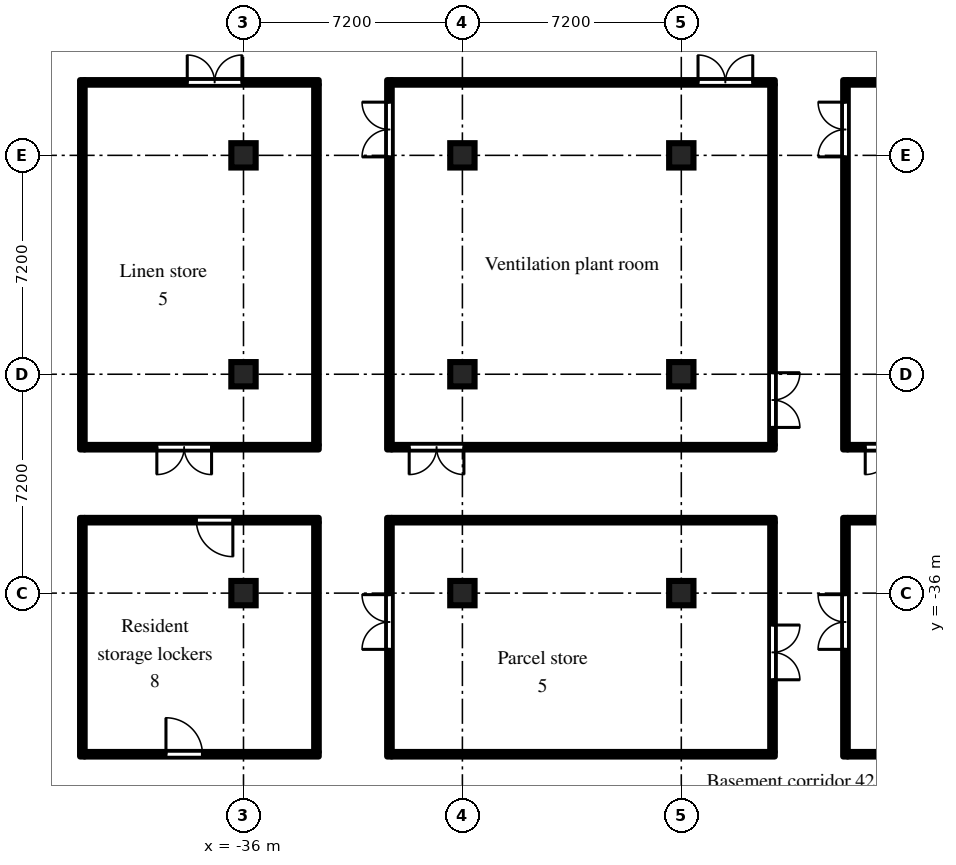
"""IFC4 building model, lengths in metres.
Left out: names, types, materials, properties, quantities, classifications, styles, units other than length and angle.
Written with IfcOpenShell. Run it as: python <this file> out.ifc"""

import sys

from ifc_helpers import new_model, si_unit, direction, frame, frame_2d, origin, origin_2d, place, context, subcontext, project, spatial, rectangle, extrude, element, fill, save


model = new_model("IFC4")
c1 = context("Model", 3, precision=1e-05, world=origin(), true_north=direction((0.0, 1.0)))
c2 = subcontext(c1, "Body", "Model", "MODEL_VIEW")
j1 = project(units=[si_unit("LENGTHUNIT", "METRE"), si_unit("PLANEANGLEUNIT", "RADIAN")], contexts=[c1])
p1 = place(None, origin())
s1 = spatial("IfcSite", under=j1, at=p1, CompositionType="ELEMENT")
p2 = place(p1, origin())
s2 = spatial("IfcBuilding", under=s1, at=p2, CompositionType="ELEMENT")
p3 = place(p2, frame((0.0, 0.0, -4.8)))
s3 = spatial("IfcBuildingStorey", under=s2, at=p3, CompositionType="ELEMENT", Elevation=-4.8)
for number, where, z_axis, x_axis in (
    (1, (-36.0, -36.0, -0.5), (0.0, 0.0, 1.0), (1.0, 0.0, 0.0)),
    (2, (-36.0, -28.8, -0.5), (0.0, 0.0, 1.0), (1.0, 0.0, 0.0)),
    (3, (-36.0, -21.6, -0.5), (0.0, 0.0, 1.0), (1.0, 0.0, 0.0)),
    (4, (-28.8, -36.0, -0.5), (0.0, 0.0, 1.0), (1.0, 0.0, 0.0)),
    (5, (-28.8, -28.8, -0.5), (0.0, 0.0, 1.0), (1.0, 0.0, 0.0)),
    (6, (-28.8, -21.6, -0.5), (0.0, 0.0, 1.0), (1.0, 0.0, 0.0)),
    (7, (-21.6, -36.0, -0.5), (0.0, 0.0, 1.0), (1.0, 0.0, 0.0)),
    (8, (-21.6, -28.8, -0.5), (0.0, 0.0, 1.0), (1.0, 0.0, 0.0)),
    (9, (-21.6, -21.6, -0.5), (0.0, 0.0, 1.0), (1.0, 0.0, 0.0)),
):
    element("IfcColumn", number, at=place(p3, frame(where, z_axis=z_axis, x_axis=x_axis)), inside=s3, PredefinedType="COLUMN", context=c2, shape_type="SweptSolid", body=[
        extrude(rectangle(XDim=0.8, YDim=0.8, at=origin_2d()), origin(), (0.0, 0.0, 1.0), 5.3),
    ])
p4 = place(p3, frame((-41.3, -41.375, 0.0), z_axis=(0.0, 0.0, 1.0), x_axis=(0.0, 1.0, 0.0)))
e10 = element("IfcWall", 10, at=p4, inside=s3, PredefinedType="PARTITIONING", context=c2, shape_type="SweptSolid", body=[
    extrude(rectangle(XDim=7.85, YDim=0.15, at=frame_2d((3.925, 0.0))), origin(), (0.0, 0.0, 1.0), 4.35),
])
p5 = place(p3, frame((-41.225, -41.3, 0.0), z_axis=(0.0, 0.0, 1.0), x_axis=(1.0, 0.0, 0.0)))
e11 = element("IfcWall", 11, at=p5, inside=s3, PredefinedType="PARTITIONING", context=c2, shape_type="SweptSolid", body=[
    extrude(rectangle(XDim=7.7, YDim=0.15, at=frame_2d((3.85, 0.0))), origin(), (0.0, 0.0, 1.0), 4.35),
])
p6 = place(p5, frame((2.675, 0.0, 0.0)))
e12 = element("IfcOpeningElement", 12, at=p6, cuts=e11, PredefinedType="OPENING", context=c2, shape_type="SweptSolid", body=[
    extrude(rectangle(XDim=1.2, YDim=2.1, at=frame_2d((0.6, 1.05))), frame((0.0, 0.085, 0.0), z_axis=(0.0, -1.0, 0.0), x_axis=(1.0, 0.0, 0.0)), (0.0, 0.0, 1.0), 0.17),
])
p7 = place(p3, frame((-41.225, -33.6, 0.0), z_axis=(0.0, 0.0, 1.0), x_axis=(1.0, 0.0, 0.0)))
e13 = element("IfcWall", 13, at=p7, inside=s3, PredefinedType="PARTITIONING", context=c2, shape_type="SweptSolid", body=[
    extrude(rectangle(XDim=7.7, YDim=0.15, at=frame_2d((3.85, 0.0))), origin(), (0.0, 0.0, 1.0), 4.35),
])
p8 = place(p7, frame((3.675, 0.0, 0.0)))
e14 = element("IfcOpeningElement", 14, at=p8, cuts=e13, PredefinedType="OPENING", context=c2, shape_type="SweptSolid", body=[
    extrude(rectangle(XDim=1.2, YDim=2.1, at=frame_2d((0.6, 1.05))), frame((0.0, 0.085, 0.0), z_axis=(0.0, -1.0, 0.0), x_axis=(1.0, 0.0, 0.0)), (0.0, 0.0, 1.0), 0.17),
])
p9 = place(p3, frame((-41.3, -31.275, 0.0), z_axis=(0.0, 0.0, 1.0), x_axis=(0.0, 1.0, 0.0)))
e15 = element("IfcWall", 15, at=p9, inside=s3, PredefinedType="PARTITIONING", context=c2, shape_type="SweptSolid", body=[
    extrude(rectangle(XDim=12.15, YDim=0.15, at=frame_2d((6.075, 0.0))), origin(), (0.0, 0.0, 1.0), 4.35),
])
p10 = place(p3, frame((-41.225, -31.2, 0.0), z_axis=(0.0, 0.0, 1.0), x_axis=(1.0, 0.0, 0.0)))
e16 = element("IfcWall", 16, at=p10, inside=s3, PredefinedType="PARTITIONING", context=c2, shape_type="SweptSolid", body=[
    extrude(rectangle(XDim=7.7, YDim=0.15, at=frame_2d((3.85, 0.0))), origin(), (0.0, 0.0, 1.0), 4.35),
])
p11 = place(p10, frame((2.375, 0.0, 0.0)))
e17 = element("IfcOpeningElement", 17, at=p11, cuts=e16, PredefinedType="OPENING", context=c2, shape_type="SweptSolid", body=[
    extrude(rectangle(XDim=1.8, YDim=2.1, at=frame_2d((0.9, 1.05))), frame((0.0, 0.085, 0.0), z_axis=(0.0, -1.0, 0.0), x_axis=(1.0, 0.0, 0.0)), (0.0, 0.0, 1.0), 0.17),
])
p12 = place(p3, frame((-41.225, -19.2, 0.0), z_axis=(0.0, 0.0, 1.0), x_axis=(1.0, 0.0, 0.0)))
e18 = element("IfcWall", 18, at=p12, inside=s3, PredefinedType="PARTITIONING", context=c2, shape_type="SweptSolid", body=[
    extrude(rectangle(XDim=7.7, YDim=0.15, at=frame_2d((3.85, 0.0))), origin(), (0.0, 0.0, 1.0), 4.35),
])
p13 = place(p12, frame((3.375, 0.0, 0.0)))
e19 = element("IfcOpeningElement", 19, at=p13, cuts=e18, PredefinedType="OPENING", context=c2, shape_type="SweptSolid", body=[
    extrude(rectangle(XDim=1.8, YDim=2.1, at=frame_2d((0.9, 1.05))), frame((0.0, 0.085, 0.0), z_axis=(0.0, -1.0, 0.0), x_axis=(1.0, 0.0, 0.0)), (0.0, 0.0, 1.0), 0.17),
])
p14 = place(p3, frame((-33.6, -41.225, 0.0), z_axis=(0.0, 0.0, 1.0), x_axis=(0.0, 1.0, 0.0)))
e20 = element("IfcWall", 20, at=p14, inside=s3, PredefinedType="PARTITIONING", context=c2, shape_type="SweptSolid", body=[
    extrude(rectangle(XDim=7.55, YDim=0.15, at=frame_2d((3.775, 0.0))), origin(), (0.0, 0.0, 1.0), 4.35),
])
p15 = place(p3, frame((-33.6, -31.125, 0.0), z_axis=(0.0, 0.0, 1.0), x_axis=(0.0, 1.0, 0.0)))
e21 = element("IfcWall", 21, at=p15, inside=s3, PredefinedType="PARTITIONING", context=c2, shape_type="SweptSolid", body=[
    extrude(rectangle(XDim=11.85, YDim=0.15, at=frame_2d((5.925, 0.0))), origin(), (0.0, 0.0, 1.0), 4.35),
])
p16 = place(p3, frame((-31.2, -41.375, 0.0), z_axis=(0.0, 0.0, 1.0), x_axis=(0.0, 1.0, 0.0)))
e22 = element("IfcWall", 22, at=p16, inside=s3, PredefinedType="PARTITIONING", context=c2, shape_type="SweptSolid", body=[
    extrude(rectangle(XDim=7.85, YDim=0.15, at=frame_2d((3.925, 0.0))), origin(), (0.0, 0.0, 1.0), 4.35),
])
p17 = place(p16, frame((3.525, 0.0, 0.0)))
e23 = element("IfcOpeningElement", 23, at=p17, cuts=e22, PredefinedType="OPENING", context=c2, shape_type="SweptSolid", body=[
    extrude(rectangle(XDim=1.8, YDim=2.1, at=frame_2d((0.9, 1.05))), frame((0.0, 0.085, 0.0), z_axis=(0.0, -1.0, 0.0), x_axis=(1.0, 0.0, 0.0)), (0.0, 0.0, 1.0), 0.17),
])
for number, where, z_axis, x_axis in (
    (24, (-31.125, -41.3, 0.0), (0.0, 0.0, 1.0), (1.0, 0.0, 0.0)),
    (25, (-31.125, -33.6, 0.0), (0.0, 0.0, 1.0), (1.0, 0.0, 0.0)),
):
    element("IfcWall", number, at=place(p3, frame(where, z_axis=z_axis, x_axis=x_axis)), inside=s3, PredefinedType="PARTITIONING", context=c2, shape_type="SweptSolid", body=[
        extrude(rectangle(XDim=12.6, YDim=0.15, at=frame_2d((6.3, 0.0))), origin(), (0.0, 0.0, 1.0), 4.35),
    ])
p18 = place(p3, frame((-31.2, -31.275, 0.0), z_axis=(0.0, 0.0, 1.0), x_axis=(0.0, 1.0, 0.0)))
e26 = element("IfcWall", 26, at=p18, inside=s3, PredefinedType="PARTITIONING", context=c2, shape_type="SweptSolid", body=[
    extrude(rectangle(XDim=12.15, YDim=0.15, at=frame_2d((6.075, 0.0))), origin(), (0.0, 0.0, 1.0), 4.35),
])
p19 = place(p18, frame((9.625, 0.0, 0.0)))
e27 = element("IfcOpeningElement", 27, at=p19, cuts=e26, PredefinedType="OPENING", context=c2, shape_type="SweptSolid", body=[
    extrude(rectangle(XDim=1.8, YDim=2.1, at=frame_2d((0.9, 1.05))), frame((0.0, 0.085, 0.0), z_axis=(0.0, -1.0, 0.0), x_axis=(1.0, 0.0, 0.0)), (0.0, 0.0, 1.0), 0.17),
])
p20 = place(p3, frame((-31.125, -31.2, 0.0), z_axis=(0.0, 0.0, 1.0), x_axis=(1.0, 0.0, 0.0)))
e28 = element("IfcWall", 28, at=p20, inside=s3, PredefinedType="PARTITIONING", context=c2, shape_type="SweptSolid", body=[
    extrude(rectangle(XDim=12.6, YDim=0.15, at=frame_2d((6.3, 0.0))), origin(), (0.0, 0.0, 1.0), 4.35),
])
p21 = place(p20, frame((0.575, 0.0, 0.0)))
e29 = element("IfcOpeningElement", 29, at=p21, cuts=e28, PredefinedType="OPENING", context=c2, shape_type="SweptSolid", body=[
    extrude(rectangle(XDim=1.8, YDim=2.1, at=frame_2d((0.9, 1.05))), frame((0.0, 0.085, 0.0), z_axis=(0.0, -1.0, 0.0), x_axis=(1.0, 0.0, 0.0)), (0.0, 0.0, 1.0), 0.17),
])
p22 = place(p3, frame((-31.125, -19.2, 0.0), z_axis=(0.0, 0.0, 1.0), x_axis=(1.0, 0.0, 0.0)))
e30 = element("IfcWall", 30, at=p22, inside=s3, PredefinedType="PARTITIONING", context=c2, shape_type="SweptSolid", body=[
    extrude(rectangle(XDim=12.6, YDim=0.15, at=frame_2d((6.3, 0.0))), origin(), (0.0, 0.0, 1.0), 4.35),
])
p23 = place(p22, frame((10.075, 0.0, 0.0)))
e31 = element("IfcOpeningElement", 31, at=p23, cuts=e30, PredefinedType="OPENING", context=c2, shape_type="SweptSolid", body=[
    extrude(rectangle(XDim=1.8, YDim=2.1, at=frame_2d((0.9, 1.05))), frame((0.0, 0.085, 0.0), z_axis=(0.0, -1.0, 0.0), x_axis=(1.0, 0.0, 0.0)), (0.0, 0.0, 1.0), 0.17),
])
p24 = place(p3, frame((-18.6, -41.225, 0.0), z_axis=(0.0, 0.0, 1.0), x_axis=(0.0, 1.0, 0.0)))
e32 = element("IfcWall", 32, at=p24, inside=s3, PredefinedType="PARTITIONING", context=c2, shape_type="SweptSolid", body=[
    extrude(rectangle(XDim=7.55, YDim=0.15, at=frame_2d((3.775, 0.0))), origin(), (0.0, 0.0, 1.0), 4.35),
])
p25 = place(p24, frame((2.375, 0.0, 0.0)))
e33 = element("IfcOpeningElement", 33, at=p25, cuts=e32, PredefinedType="OPENING", context=c2, shape_type="SweptSolid", body=[
    extrude(rectangle(XDim=1.8, YDim=2.1, at=frame_2d((0.9, 1.05))), frame((0.0, 0.085, 0.0), z_axis=(0.0, -1.0, 0.0), x_axis=(1.0, 0.0, 0.0)), (0.0, 0.0, 1.0), 0.17),
])
p26 = place(p3, frame((-18.6, -31.125, 0.0), z_axis=(0.0, 0.0, 1.0), x_axis=(0.0, 1.0, 0.0)))
e34 = element("IfcWall", 34, at=p26, inside=s3, PredefinedType="PARTITIONING", context=c2, shape_type="SweptSolid", body=[
    extrude(rectangle(XDim=11.85, YDim=0.15, at=frame_2d((5.925, 0.0))), origin(), (0.0, 0.0, 1.0), 4.35),
])
p27 = place(p26, frame((0.575, 0.0, 0.0)))
e35 = element("IfcOpeningElement", 35, at=p27, cuts=e34, PredefinedType="OPENING", context=c2, shape_type="SweptSolid", body=[
    extrude(rectangle(XDim=1.8, YDim=2.1, at=frame_2d((0.9, 1.05))), frame((0.0, 0.085, 0.0), z_axis=(0.0, -1.0, 0.0), x_axis=(1.0, 0.0, 0.0)), (0.0, 0.0, 1.0), 0.17),
])
p28 = place(p3, frame((-16.2, -41.375, 0.0), z_axis=(0.0, 0.0, 1.0), x_axis=(0.0, 1.0, 0.0)))
e36 = element("IfcWall", 36, at=p28, inside=s3, PredefinedType="PARTITIONING", context=c2, shape_type="SweptSolid", body=[
    extrude(rectangle(XDim=7.85, YDim=0.15, at=frame_2d((3.925, 0.0))), origin(), (0.0, 0.0, 1.0), 4.35),
])
p29 = place(p28, frame((3.525, 0.0, 0.0)))
e37 = element("IfcOpeningElement", 37, at=p29, cuts=e36, PredefinedType="OPENING", context=c2, shape_type="SweptSolid", body=[
    extrude(rectangle(XDim=1.8, YDim=2.1, at=frame_2d((0.9, 1.05))), frame((0.0, 0.085, 0.0), z_axis=(0.0, -1.0, 0.0), x_axis=(1.0, 0.0, 0.0)), (0.0, 0.0, 1.0), 0.17),
])
p30 = place(p3, frame((-16.125, -41.3, 0.0), z_axis=(0.0, 0.0, 1.0), x_axis=(1.0, 0.0, 0.0)))
e38 = element("IfcWall", 38, at=p30, inside=s3, PredefinedType="PARTITIONING", context=c2, shape_type="SweptSolid", body=[
    extrude(rectangle(XDim=14.625, YDim=0.15, at=frame_2d((7.312, 0.0))), origin(), (0.0, 0.0, 1.0), 4.35),
])
p31 = place(p30, frame((10.725, 0.0, 0.0)))
e39 = element("IfcOpeningElement", 39, at=p31, cuts=e38, PredefinedType="OPENING", context=c2, shape_type="SweptSolid", body=[
    extrude(rectangle(XDim=1.8, YDim=2.1, at=frame_2d((0.9, 1.05))), frame((0.0, 0.085, 0.0), z_axis=(0.0, -1.0, 0.0), x_axis=(1.0, 0.0, 0.0)), (0.0, 0.0, 1.0), 0.17),
])
p32 = place(p3, frame((-16.125, -33.6, 0.0), z_axis=(0.0, 0.0, 1.0), x_axis=(1.0, 0.0, 0.0)))
e40 = element("IfcWall", 40, at=p32, inside=s3, PredefinedType="PARTITIONING", context=c2, shape_type="SweptSolid", body=[
    extrude(rectangle(XDim=15.0, YDim=0.15, at=frame_2d((7.5, 0.0))), origin(), (0.0, 0.0, 1.0), 4.35),
])
p33 = place(p32, frame((12.475, 0.0, 0.0)))
e41 = element("IfcOpeningElement", 41, at=p33, cuts=e40, PredefinedType="OPENING", context=c2, shape_type="SweptSolid", body=[
    extrude(rectangle(XDim=1.8, YDim=2.1, at=frame_2d((0.9, 1.05))), frame((0.0, 0.085, 0.0), z_axis=(0.0, -1.0, 0.0), x_axis=(1.0, 0.0, 0.0)), (0.0, 0.0, 1.0), 0.17),
])
p34 = place(p3, frame((-16.2, -31.275, 0.0), z_axis=(0.0, 0.0, 1.0), x_axis=(0.0, 1.0, 0.0)))
e42 = element("IfcWall", 42, at=p34, inside=s3, PredefinedType="PARTITIONING", context=c2, shape_type="SweptSolid", body=[
    extrude(rectangle(XDim=12.15, YDim=0.15, at=frame_2d((6.075, 0.0))), origin(), (0.0, 0.0, 1.0), 4.35),
])
p35 = place(p34, frame((9.625, 0.0, 0.0)))
e43 = element("IfcOpeningElement", 43, at=p35, cuts=e42, PredefinedType="OPENING", context=c2, shape_type="SweptSolid", body=[
    extrude(rectangle(XDim=1.8, YDim=2.1, at=frame_2d((0.9, 1.05))), frame((0.0, 0.085, 0.0), z_axis=(0.0, -1.0, 0.0), x_axis=(1.0, 0.0, 0.0)), (0.0, 0.0, 1.0), 0.17),
])
p36 = place(p3, frame((-16.125, -31.2, 0.0), z_axis=(0.0, 0.0, 1.0), x_axis=(1.0, 0.0, 0.0)))
e44 = element("IfcWall", 44, at=p36, inside=s3, PredefinedType="PARTITIONING", context=c2, shape_type="SweptSolid", body=[
    extrude(rectangle(XDim=15.0, YDim=0.15, at=frame_2d((7.5, 0.0))), origin(), (0.0, 0.0, 1.0), 4.35),
])
p37 = place(p36, frame((0.575, 0.0, 0.0)))
e45 = element("IfcOpeningElement", 45, at=p37, cuts=e44, PredefinedType="OPENING", context=c2, shape_type="SweptSolid", body=[
    extrude(rectangle(XDim=1.8, YDim=2.1, at=frame_2d((0.9, 1.05))), frame((0.0, 0.085, 0.0), z_axis=(0.0, -1.0, 0.0), x_axis=(1.0, 0.0, 0.0)), (0.0, 0.0, 1.0), 0.17),
])
p38 = place(p3, frame((-16.125, -19.2, 0.0), z_axis=(0.0, 0.0, 1.0), x_axis=(1.0, 0.0, 0.0)))
e46 = element("IfcWall", 46, at=p38, inside=s3, PredefinedType="PARTITIONING", context=c2, shape_type="SweptSolid", body=[
    extrude(rectangle(XDim=15.0, YDim=0.15, at=frame_2d((7.5, 0.0))), origin(), (0.0, 0.0, 1.0), 4.35),
])
p39 = place(p38, frame((12.475, 0.0, 0.0)))
e47 = element("IfcOpeningElement", 47, at=p39, cuts=e46, PredefinedType="OPENING", context=c2, shape_type="SweptSolid", body=[
    extrude(rectangle(XDim=1.8, YDim=2.1, at=frame_2d((0.9, 1.05))), frame((0.0, 0.085, 0.0), z_axis=(0.0, -1.0, 0.0), x_axis=(1.0, 0.0, 0.0)), (0.0, 0.0, 1.0), 0.17),
])
p40 = place(p6, origin())
e48 = element("IfcDoor", 48, at=p40, inside=s3, OperationType="SINGLE_SWING_LEFT", PredefinedType="DOOR", context=c2, shape_type="SweptSolid", body=[
    extrude(rectangle(XDim=1.2, YDim=2.1, at=frame_2d((0.6, 1.05))), frame((0.0, 0.025, 0.0), z_axis=(0.0, -1.0, 0.0), x_axis=(1.0, 0.0, 0.0)), (0.0, 0.0, 1.0), 0.05),
])
fill(e12, e48)
p41 = place(p8, frame((1.2, 0.0, 0.0), z_axis=(0.0, 0.0, 1.0), x_axis=(-1.0, 0.0, 0.0)))
e49 = element("IfcDoor", 49, at=p41, inside=s3, OperationType="SINGLE_SWING_LEFT", PredefinedType="DOOR", context=c2, shape_type="SweptSolid", body=[
    extrude(rectangle(XDim=1.2, YDim=2.1, at=frame_2d((0.6, 1.05))), frame((0.0, 0.025, 0.0), z_axis=(0.0, -1.0, 0.0), x_axis=(1.0, 0.0, 0.0)), (0.0, 0.0, 1.0), 0.05),
])
fill(e14, e49)
p42 = place(p17, origin())
e50 = element("IfcDoor", 50, at=p42, inside=s3, OperationType="DOUBLE_DOOR_DOUBLE_SWING", PredefinedType="DOOR", context=c2, shape_type="SweptSolid", body=[
    extrude(rectangle(XDim=1.8, YDim=2.1, at=frame_2d((0.9, 1.05))), frame((0.0, 0.025, 0.0), z_axis=(0.0, -1.0, 0.0), x_axis=(1.0, 0.0, 0.0)), (0.0, 0.0, 1.0), 0.05),
])
fill(e23, e50)
p43 = place(p25, frame((1.8, 0.0, 0.0), z_axis=(0.0, 0.0, 1.0), x_axis=(-1.0, 0.0, 0.0)))
e51 = element("IfcDoor", 51, at=p43, inside=s3, OperationType="DOUBLE_DOOR_DOUBLE_SWING", PredefinedType="DOOR", context=c2, shape_type="SweptSolid", body=[
    extrude(rectangle(XDim=1.8, YDim=2.1, at=frame_2d((0.9, 1.05))), frame((0.0, 0.025, 0.0), z_axis=(0.0, -1.0, 0.0), x_axis=(1.0, 0.0, 0.0)), (0.0, 0.0, 1.0), 0.05),
])
fill(e33, e51)
p44 = place(p29, origin())
e52 = element("IfcDoor", 52, at=p44, inside=s3, OperationType="DOUBLE_DOOR_DOUBLE_SWING", PredefinedType="DOOR", context=c2, shape_type="SweptSolid", body=[
    extrude(rectangle(XDim=1.8, YDim=2.1, at=frame_2d((0.9, 1.05))), frame((0.0, 0.025, 0.0), z_axis=(0.0, -1.0, 0.0), x_axis=(1.0, 0.0, 0.0)), (0.0, 0.0, 1.0), 0.05),
])
fill(e37, e52)
p45 = place(p35, origin())
e53 = element("IfcDoor", 53, at=p45, inside=s3, OperationType="DOUBLE_DOOR_DOUBLE_SWING", PredefinedType="DOOR", context=c2, shape_type="SweptSolid", body=[
    extrude(rectangle(XDim=1.8, YDim=2.1, at=frame_2d((0.9, 1.05))), frame((0.0, 0.025, 0.0), z_axis=(0.0, -1.0, 0.0), x_axis=(1.0, 0.0, 0.0)), (0.0, 0.0, 1.0), 0.05),
])
fill(e43, e53)
p46 = place(p37, frame((1.8, 0.0, 0.0), z_axis=(0.0, 0.0, 1.0), x_axis=(-1.0, 0.0, 0.0)))
e54 = element("IfcDoor", 54, at=p46, inside=s3, OperationType="DOUBLE_DOOR_DOUBLE_SWING", PredefinedType="DOOR", context=c2, shape_type="SweptSolid", body=[
    extrude(rectangle(XDim=1.8, YDim=2.1, at=frame_2d((0.9, 1.05))), frame((0.0, 0.025, 0.0), z_axis=(0.0, -1.0, 0.0), x_axis=(1.0, 0.0, 0.0)), (0.0, 0.0, 1.0), 0.05),
])
fill(e45, e54)
p47 = place(p19, origin())
e55 = element("IfcDoor", 55, at=p47, inside=s3, OperationType="DOUBLE_DOOR_DOUBLE_SWING", PredefinedType="DOOR", context=c2, shape_type="SweptSolid", body=[
    extrude(rectangle(XDim=1.8, YDim=2.1, at=frame_2d((0.9, 1.05))), frame((0.0, 0.025, 0.0), z_axis=(0.0, -1.0, 0.0), x_axis=(1.0, 0.0, 0.0)), (0.0, 0.0, 1.0), 0.05),
])
fill(e27, e55)
p48 = place(p21, frame((1.8, 0.0, 0.0), z_axis=(0.0, 0.0, 1.0), x_axis=(-1.0, 0.0, 0.0)))
e56 = element("IfcDoor", 56, at=p48, inside=s3, OperationType="DOUBLE_DOOR_DOUBLE_SWING", PredefinedType="DOOR", context=c2, shape_type="SweptSolid", body=[
    extrude(rectangle(XDim=1.8, YDim=2.1, at=frame_2d((0.9, 1.05))), frame((0.0, 0.025, 0.0), z_axis=(0.0, -1.0, 0.0), x_axis=(1.0, 0.0, 0.0)), (0.0, 0.0, 1.0), 0.05),
])
fill(e29, e56)
p49 = place(p23, origin())
e57 = element("IfcDoor", 57, at=p49, inside=s3, OperationType="DOUBLE_DOOR_DOUBLE_SWING", PredefinedType="DOOR", context=c2, shape_type="SweptSolid", body=[
    extrude(rectangle(XDim=1.8, YDim=2.1, at=frame_2d((0.9, 1.05))), frame((0.0, 0.025, 0.0), z_axis=(0.0, -1.0, 0.0), x_axis=(1.0, 0.0, 0.0)), (0.0, 0.0, 1.0), 0.05),
])
fill(e31, e57)
p50 = place(p27, frame((1.8, 0.0, 0.0), z_axis=(0.0, 0.0, 1.0), x_axis=(-1.0, 0.0, 0.0)))
e58 = element("IfcDoor", 58, at=p50, inside=s3, OperationType="DOUBLE_DOOR_DOUBLE_SWING", PredefinedType="DOOR", context=c2, shape_type="SweptSolid", body=[
    extrude(rectangle(XDim=1.8, YDim=2.1, at=frame_2d((0.9, 1.05))), frame((0.0, 0.025, 0.0), z_axis=(0.0, -1.0, 0.0), x_axis=(1.0, 0.0, 0.0)), (0.0, 0.0, 1.0), 0.05),
])
fill(e35, e58)
p51 = place(p11, frame((1.8, 0.0, 0.0), z_axis=(0.0, 0.0, 1.0), x_axis=(-1.0, 0.0, 0.0)))
e59 = element("IfcDoor", 59, at=p51, inside=s3, OperationType="DOUBLE_DOOR_DOUBLE_SWING", PredefinedType="DOOR", context=c2, shape_type="SweptSolid", body=[
    extrude(rectangle(XDim=1.8, YDim=2.1, at=frame_2d((0.9, 1.05))), frame((0.0, 0.025, 0.0), z_axis=(0.0, -1.0, 0.0), x_axis=(1.0, 0.0, 0.0)), (0.0, 0.0, 1.0), 0.05),
])
fill(e17, e59)
p52 = place(p13, origin())
e60 = element("IfcDoor", 60, at=p52, inside=s3, OperationType="DOUBLE_DOOR_DOUBLE_SWING", PredefinedType="DOOR", context=c2, shape_type="SweptSolid", body=[
    extrude(rectangle(XDim=1.8, YDim=2.1, at=frame_2d((0.9, 1.05))), frame((0.0, 0.025, 0.0), z_axis=(0.0, -1.0, 0.0), x_axis=(1.0, 0.0, 0.0)), (0.0, 0.0, 1.0), 0.05),
])
fill(e19, e60)
save(model, sys.argv[1])
